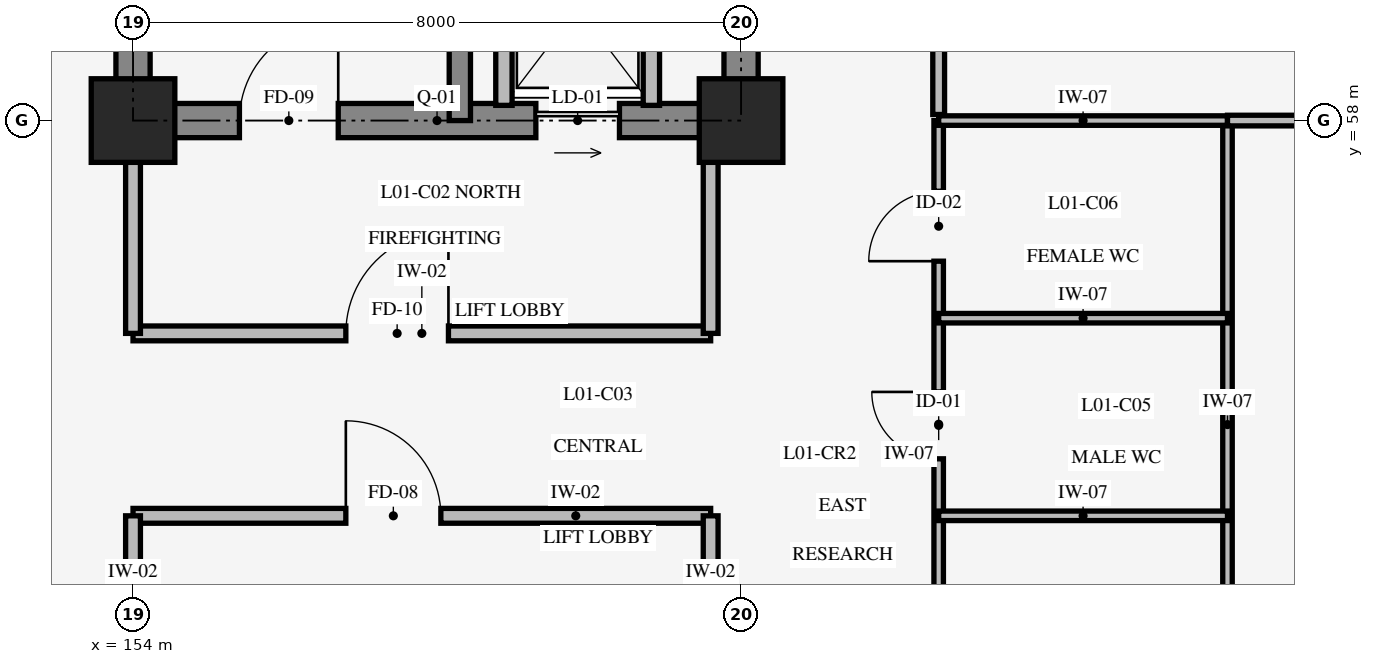
"""IFC4 building model, lengths in metres.
Left out: names, types, materials, properties, quantities, classifications, styles, units other than length and angle.
Written with IfcOpenShell. Run it as: python <this file> out.ifc"""

import sys

from ifc_helpers import new_model, si_unit, direction, frame, frame_2d, origin, origin_2d, place, context, subcontext, project, spatial, rectangle, extrude, element, fill, save


model = new_model("IFC4")
c1 = context("Model", 3, precision=1e-05, world=origin(), true_north=direction((0.0, 1.0)))
c2 = subcontext(c1, "Body", "Model", "MODEL_VIEW")
j1 = project(units=[si_unit("LENGTHUNIT", "METRE"), si_unit("PLANEANGLEUNIT", "RADIAN")], contexts=[c1])
p1 = place(None, origin())
s1 = spatial("IfcSite", under=j1, at=p1, CompositionType="ELEMENT")
p2 = place(p1, origin())
s2 = spatial("IfcBuilding", under=s1, at=p2, CompositionType="ELEMENT")
p3 = place(p2, origin())
s3 = spatial("IfcBuildingStorey", under=s2, at=p3, CompositionType="ELEMENT", Elevation=0.0)
p4 = place(p3, frame((154.0, 58.0, 0.0), z_axis=(0.0, 0.0, 1.0), x_axis=(1.0, 0.0, 0.0)))
e1 = element("IfcWall", 1, at=p4, inside=s3, PredefinedType="SHEAR", context=c2, shape_type="SweptSolid", body=[
    extrude(rectangle(XDim=8.0, YDim=0.45, at=frame_2d((4.0, 0.0))), origin(), (0.0, 0.0, 1.0), 5.12),
])
p5 = place(p4, frame((1.4, 0.0, 0.0)))
e2 = element("IfcOpeningElement", 2, at=p5, cuts=e1, PredefinedType="OPENING", context=c2, shape_type="SweptSolid", body=[
    extrude(rectangle(XDim=1.3, YDim=2.15, at=frame_2d((0.65, 1.075))), frame((0.0, 0.235, 0.0), z_axis=(0.0, -1.0, 0.0), x_axis=(1.0, 0.0, 0.0)), (0.0, 0.0, 1.0), 0.47),
])
p6 = place(p4, frame((5.3, 0.0, 0.0)))
e3 = element("IfcOpeningElement", 3, at=p6, cuts=e1, PredefinedType="OPENING", context=c2, shape_type="SweptSolid", body=[
    extrude(rectangle(XDim=1.1, YDim=2.2, at=frame_2d((0.55, 1.1))), frame((0.0, 0.235, 0.0), z_axis=(0.0, -1.0, 0.0), x_axis=(1.0, 0.0, 0.0)), (0.0, 0.0, 1.0), 0.47),
])
p7 = place(p3, frame((162.0, 58.0, 0.0), z_axis=(0.0, 0.0, 1.0), x_axis=(0.0, 1.0, 0.0)))
e4 = element("IfcWall", 4, at=p7, inside=s3, PredefinedType="SHEAR", context=c2, shape_type="SweptSolid", body=[
    extrude(rectangle(XDim=8.0, YDim=0.45, at=frame_2d((4.0, 0.0))), origin(), (0.0, 0.0, 1.0), 5.12),
])
p8 = place(p7, frame((3.275, 0.0, 0.0)))
e5 = element("IfcOpeningElement", 5, at=p8, cuts=e4, PredefinedType="OPENING", context=c2, shape_type="SweptSolid", body=[
    extrude(rectangle(XDim=1.05, YDim=2.2, at=frame_2d((0.525, 1.1))), frame((0.0, 0.235, 0.0), z_axis=(0.0, -1.0, 0.0), x_axis=(1.0, 0.0, 0.0)), (0.0, 0.0, 1.0), 0.47),
])
p9 = place(p7, frame((5.45, 0.0, 0.0)))
e6 = element("IfcOpeningElement", 6, at=p9, cuts=e4, PredefinedType="OPENING", context=c2, shape_type="SweptSolid", body=[
    extrude(rectangle(XDim=1.4, YDim=2.3, at=frame_2d((0.7, 1.15))), frame((0.0, 0.235, 0.0), z_axis=(0.0, -1.0, 0.0), x_axis=(1.0, 0.0, 0.0)), (0.0, 0.0, 1.0), 0.47),
])
p10 = place(p3, frame((154.0, 66.0, 0.0), z_axis=(0.0, 0.0, 1.0), x_axis=(0.0, -1.0, 0.0)))
e7 = element("IfcWall", 7, at=p10, inside=s3, PredefinedType="SHEAR", context=c2, shape_type="SweptSolid", body=[
    extrude(rectangle(XDim=8.0, YDim=0.45, at=frame_2d((4.0, 0.0))), origin(), (0.0, 0.0, 1.0), 5.12),
])
p11 = place(p3, frame((158.3, 58.0, 0.0), z_axis=(0.0, 0.0, 1.0), x_axis=(0.0, 1.0, 0.0)))
e8 = element("IfcWall", 8, at=p11, inside=s3, PredefinedType="SHEAR", context=c2, shape_type="SweptSolid", body=[
    extrude(rectangle(XDim=8.0, YDim=0.28, at=frame_2d((4.0, 0.0))), origin(), (0.0, 0.0, 1.0), 5.12),
])
for number, where, z_axis, x_axis in (
    (9, (154.0, 58.0, 0.0), (0.0, 0.0, 1.0), (1.0, 0.0, 0.0)),
    (10, (162.0, 58.0, 0.0), (0.0, 0.0, 1.0), (1.0, 0.0, 0.0)),
):
    element("IfcColumn", number, at=place(p3, frame(where, z_axis=z_axis, x_axis=x_axis)), inside=s3, PredefinedType="COLUMN", context=c2, shape_type="SweptSolid", body=[
        extrude(rectangle(XDim=1.1, YDim=1.1, at=origin_2d()), origin(), (0.0, 0.0, 1.0), 5.4),
    ])
for number, where, z_axis, x_axis in (
    (11, (160.82, 58.2, 0.0), (0.0, 0.0, 1.0), (0.0, 1.0, 0.0)),
    (12, (158.88, 58.2, 0.0), (0.0, 0.0, 1.0), (0.0, 1.0, 0.0)),
):
    element("IfcWall", number, at=place(p3, frame(where, z_axis=z_axis, x_axis=x_axis)), inside=s3, PredefinedType="STANDARD", context=c2, shape_type="SweptSolid", body=[
        extrude(rectangle(XDim=2.55, YDim=0.215, at=frame_2d((1.275, 0.0))), origin(), (0.0, 0.0, 1.0), 5.1),
    ])
p12 = place(p3, frame((154.0, 52.8, 0.0), z_axis=(0.0, 0.0, 1.0), x_axis=(1.0, 0.0, 0.0)))
e13 = element("IfcWall", 13, at=p12, inside=s3, PredefinedType="STANDARD", context=c2, shape_type="SweptSolid", body=[
    extrude(rectangle(XDim=7.6, YDim=0.195, at=frame_2d((3.8, 0.0))), origin(), (0.0, 0.0, 1.0), 5.1),
])
p13 = place(p12, frame((2.8, 0.0, 0.0)))
e14 = element("IfcOpeningElement", 14, at=p13, cuts=e13, PredefinedType="OPENING", context=c2, shape_type="SweptSolid", body=[
    extrude(rectangle(XDim=1.25, YDim=2.15, at=frame_2d((0.625, 1.075))), frame((0.0, 0.107, 0.0), z_axis=(0.0, -1.0, 0.0), x_axis=(1.0, 0.0, 0.0)), (0.0, 0.0, 1.0), 0.215),
])
p14 = place(p3, frame((161.6, 50.15, 0.0), z_axis=(0.0, 0.0, 1.0), x_axis=(0.0, 1.0, 0.0)))
e15 = element("IfcWall", 15, at=p14, inside=s3, PredefinedType="STANDARD", context=c2, shape_type="SweptSolid", body=[
    extrude(rectangle(XDim=2.65, YDim=0.195, at=frame_2d((1.325, 0.0))), origin(), (0.0, 0.0, 1.0), 4.15),
])
p15 = place(p3, frame((154.0, 50.5, 0.0), z_axis=(0.0, 0.0, 1.0), x_axis=(0.0, 1.0, 0.0)))
e16 = element("IfcWall", 16, at=p15, inside=s3, PredefinedType="STANDARD", context=c2, shape_type="SweptSolid", body=[
    extrude(rectangle(XDim=2.3, YDim=0.195, at=frame_2d((1.15, 0.0))), origin(), (0.0, 0.0, 1.0), 4.15),
])
p16 = place(p3, frame((154.0, 55.2, 0.0), z_axis=(0.0, 0.0, 1.0), x_axis=(1.0, 0.0, 0.0)))
e17 = element("IfcWall", 17, at=p16, inside=s3, PredefinedType="STANDARD", context=c2, shape_type="SweptSolid", body=[
    extrude(rectangle(XDim=7.6, YDim=0.195, at=frame_2d((3.8, 0.0))), origin(), (0.0, 0.0, 1.0), 5.1),
])
p17 = place(p16, frame((2.8, 0.0, 0.0)))
e18 = element("IfcOpeningElement", 18, at=p17, cuts=e17, PredefinedType="OPENING", context=c2, shape_type="SweptSolid", body=[
    extrude(rectangle(XDim=1.35, YDim=2.15, at=frame_2d((0.675, 1.075))), frame((0.0, 0.107, 0.0), z_axis=(0.0, -1.0, 0.0), x_axis=(1.0, 0.0, 0.0)), (0.0, 0.0, 1.0), 0.215),
])
p18 = place(p3, frame((161.6, 55.2, 0.0), z_axis=(0.0, 0.0, 1.0), x_axis=(0.0, 1.0, 0.0)))
e19 = element("IfcWall", 19, at=p18, inside=s3, PredefinedType="STANDARD", context=c2, shape_type="SweptSolid", body=[
    extrude(rectangle(XDim=2.65, YDim=0.195, at=frame_2d((1.325, 0.0))), origin(), (0.0, 0.0, 1.0), 4.15),
])
p19 = place(p3, frame((154.0, 55.2, 0.0), z_axis=(0.0, 0.0, 1.0), x_axis=(0.0, 1.0, 0.0)))
e20 = element("IfcWall", 20, at=p19, inside=s3, PredefinedType="STANDARD", context=c2, shape_type="SweptSolid", body=[
    extrude(rectangle(XDim=2.3, YDim=0.195, at=frame_2d((1.15, 0.0))), origin(), (0.0, 0.0, 1.0), 4.15),
])
p20 = place(p3, frame((164.6, 50.0, 0.0), z_axis=(0.0, 0.0, 1.0), x_axis=(0.0, 1.0, 0.0)))
e21 = element("IfcWall", 21, at=p20, inside=s3, PredefinedType="STANDARD", context=c2, shape_type="SweptSolid", body=[
    extrude(rectangle(XDim=8.0, YDim=0.125, at=frame_2d((4.0, 0.0))), origin(), (0.0, 0.0, 1.0), 5.1),
])
p21 = place(p20, frame((0.9, 0.0, 0.0)))
e22 = element("IfcOpeningElement", 22, at=p21, cuts=e21, PredefinedType="OPENING", context=c2, shape_type="SweptSolid", body=[
    extrude(rectangle(XDim=0.96, YDim=2.08, at=frame_2d((0.48, 1.04))), frame((0.0, 0.073, 0.0), z_axis=(0.0, -1.0, 0.0), x_axis=(1.0, 0.0, 0.0)), (0.0, 0.0, 1.0), 0.145),
])
p22 = place(p20, frame((3.55, 0.0, 0.0)))
e23 = element("IfcOpeningElement", 23, at=p22, cuts=e21, PredefinedType="OPENING", context=c2, shape_type="SweptSolid", body=[
    extrude(rectangle(XDim=0.88, YDim=2.05, at=frame_2d((0.44, 1.025))), frame((0.0, 0.073, 0.0), z_axis=(0.0, -1.0, 0.0), x_axis=(1.0, 0.0, 0.0)), (0.0, 0.0, 1.0), 0.145),
])
p23 = place(p20, frame((6.15, 0.0, 0.0)))
e24 = element("IfcOpeningElement", 24, at=p23, cuts=e21, PredefinedType="OPENING", context=c2, shape_type="SweptSolid", body=[
    extrude(rectangle(XDim=0.92, YDim=2.05, at=frame_2d((0.46, 1.025))), frame((0.0, 0.073, 0.0), z_axis=(0.0, -1.0, 0.0), x_axis=(1.0, 0.0, 0.0)), (0.0, 0.0, 1.0), 0.145),
])
p24 = place(p3, frame((168.4, 50.0, 0.0), z_axis=(0.0, 0.0, 1.0), x_axis=(0.0, 1.0, 0.0)))
e25 = element("IfcWall", 25, at=p24, inside=s3, PredefinedType="STANDARD", context=c2, shape_type="SweptSolid", body=[
    extrude(rectangle(XDim=8.0, YDim=0.125, at=frame_2d((4.0, 0.0))), origin(), (0.0, 0.0, 1.0), 5.1),
])
for number, where, z_axis, x_axis in (
    (26, (164.6, 52.8, 0.0), (0.0, 0.0, 1.0), (1.0, 0.0, 0.0)),
    (27, (164.6, 55.4, 0.0), (0.0, 0.0, 1.0), (1.0, 0.0, 0.0)),
):
    element("IfcWall", number, at=place(p3, frame(where, z_axis=z_axis, x_axis=x_axis)), inside=s3, PredefinedType="STANDARD", context=c2, shape_type="SweptSolid", body=[
        extrude(rectangle(XDim=3.8, YDim=0.125, at=frame_2d((1.9, 0.0))), origin(), (0.0, 0.0, 1.0), 5.1),
    ])
p25 = place(p3, frame((164.6, 58.0, 0.0), z_axis=(0.0, 0.0, 1.0), x_axis=(1.0, 0.0, 0.0)))
e28 = element("IfcWall", 28, at=p25, inside=s3, PredefinedType="STANDARD", context=c2, shape_type="SweptSolid", body=[
    extrude(rectangle(XDim=3.8, YDim=0.125, at=frame_2d((1.9, 0.0))), origin(), (0.0, 0.0, 1.0), 4.2),
])
p26 = place(p3, frame((168.4, 58.0, 0.0), z_axis=(0.0, 0.0, 1.0), x_axis=(1.0, 0.0, 0.0)))
e29 = element("IfcWall", 29, at=p26, inside=s3, PredefinedType="STANDARD", context=c2, shape_type="SweptSolid", body=[
    extrude(rectangle(XDim=8.96, YDim=0.14, at=frame_2d((4.48, 0.0))), origin(), (0.0, 0.0, 1.0), 4.2),
])
p27 = place(p26, frame((3.95, 0.0, 0.0)))
e30 = element("IfcOpeningElement", 30, at=p27, cuts=e29, PredefinedType="OPENING", context=c2, shape_type="SweptSolid", body=[
    extrude(rectangle(XDim=1.06, YDim=2.12, at=frame_2d((0.53, 1.06))), frame((0.0, 0.08, 0.0), z_axis=(0.0, -1.0, 0.0), x_axis=(1.0, 0.0, 0.0)), (0.0, 0.0, 1.0), 0.16),
])
p28 = place(p3, frame((164.6, 58.08, 0.0), z_axis=(0.0, 0.0, 1.0), x_axis=(0.0, 1.0, 0.0)))
e31 = element("IfcWall", 31, at=p28, inside=s3, PredefinedType="STANDARD", context=c2, shape_type="SweptSolid", body=[
    extrude(rectangle(XDim=15.8, YDim=0.155, at=frame_2d((7.9, 0.0))), origin(), (0.0, 0.0, 1.0), 5.1),
])
p29 = place(p28, frame((7.35, 0.0, 0.0)))
e32 = element("IfcOpeningElement", 32, at=p29, cuts=e31, PredefinedType="OPENING", context=c2, shape_type="SweptSolid", body=[
    extrude(rectangle(XDim=1.1, YDim=2.1, at=frame_2d((0.55, 1.05))), frame((0.0, 0.087, 0.0), z_axis=(0.0, -1.0, 0.0), x_axis=(1.0, 0.0, 0.0)), (0.0, 0.0, 1.0), 0.175),
])
p30 = place(p5, origin())
e33 = element("IfcDoor", 33, at=p30, inside=s3, OperationType="SINGLE_SWING_RIGHT", PredefinedType="DOOR", context=c2, shape_type="SweptSolid", body=[
    extrude(rectangle(XDim=1.3, YDim=2.15, at=frame_2d((0.65, 1.075))), frame((0.0, 0.025, 0.0), z_axis=(0.0, -1.0, 0.0), x_axis=(1.0, 0.0, 0.0)), (0.0, 0.0, 1.0), 0.05),
])
fill(e2, e33)
p31 = place(p6, origin())
e34 = element("IfcDoor", 34, at=p31, inside=s3, OperationType="SLIDING_TO_RIGHT", PredefinedType="DOOR", context=c2, shape_type="SweptSolid", body=[
    extrude(rectangle(XDim=1.1, YDim=2.2, at=frame_2d((0.55, 1.1))), frame((0.0, 0.025, 0.0), z_axis=(0.0, -1.0, 0.0), x_axis=(1.0, 0.0, 0.0)), (0.0, 0.0, 1.0), 0.05),
])
fill(e3, e34)
p32 = place(p13, origin())
e35 = element("IfcDoor", 35, at=p32, inside=s3, OperationType="SINGLE_SWING_LEFT", PredefinedType="DOOR", context=c2, shape_type="SweptSolid", body=[
    extrude(rectangle(XDim=1.25, YDim=2.15, at=frame_2d((0.625, 1.075))), frame((0.0, 0.025, 0.0), z_axis=(0.0, -1.0, 0.0), x_axis=(1.0, 0.0, 0.0)), (0.0, 0.0, 1.0), 0.05),
])
fill(e14, e35)
p33 = place(p17, origin())
e36 = element("IfcDoor", 36, at=p33, inside=s3, OperationType="SINGLE_SWING_RIGHT", PredefinedType="DOOR", context=c2, shape_type="SweptSolid", body=[
    extrude(rectangle(XDim=1.35, YDim=2.15, at=frame_2d((0.675, 1.075))), frame((0.0, 0.025, 0.0), z_axis=(0.0, -1.0, 0.0), x_axis=(1.0, 0.0, 0.0)), (0.0, 0.0, 1.0), 0.05),
])
fill(e18, e36)
p34 = place(p22, origin())
e37 = element("IfcDoor", 37, at=p34, inside=s3, OperationType="SINGLE_SWING_RIGHT", PredefinedType="DOOR", context=c2, shape_type="SweptSolid", body=[
    extrude(rectangle(XDim=0.88, YDim=2.05, at=frame_2d((0.44, 1.025))), frame((0.0, 0.025, 0.0), z_axis=(0.0, -1.0, 0.0), x_axis=(1.0, 0.0, 0.0)), (0.0, 0.0, 1.0), 0.05),
])
fill(e23, e37)
p35 = place(p23, origin())
e38 = element("IfcDoor", 38, at=p35, inside=s3, OperationType="SINGLE_SWING_LEFT", PredefinedType="DOOR", context=c2, shape_type="SweptSolid", body=[
    extrude(rectangle(XDim=0.92, YDim=2.05, at=frame_2d((0.46, 1.025))), frame((0.0, 0.025, 0.0), z_axis=(0.0, -1.0, 0.0), x_axis=(1.0, 0.0, 0.0)), (0.0, 0.0, 1.0), 0.05),
])
fill(e24, e38)
save(model, sys.argv[1])
